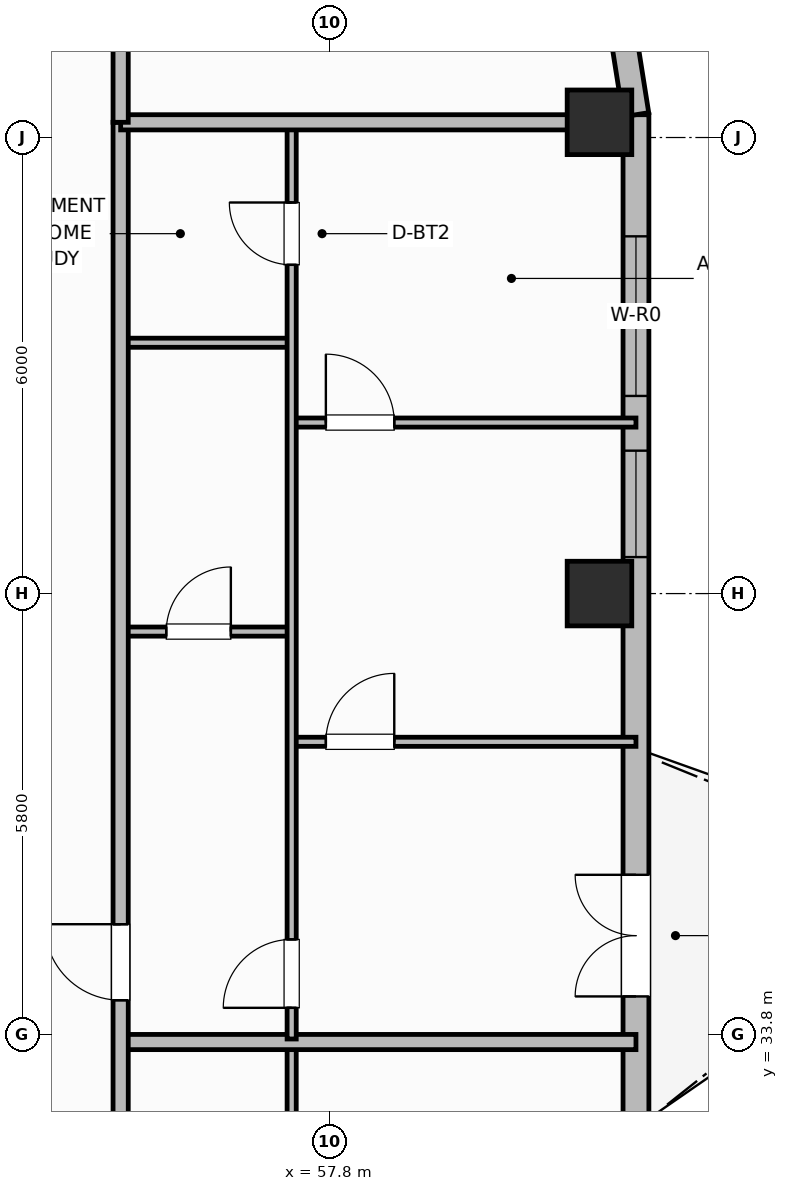
"""IFC4 building model, lengths in metres.
Left out: names, types, materials, properties, quantities, classifications, styles, units other than length and angle.
Written with IfcOpenShell. Run it as: python <this file> out.ifc"""

import sys

from ifc_helpers import new_model, si_unit, direction, frame, frame_2d, origin, origin_2d, place, context, subcontext, project, spatial, rectangle, extrude, element, fill, save


model = new_model("IFC4")
c1 = context("Model", 3, precision=1e-05, world=origin(), true_north=direction((0.0, 1.0)))
c2 = subcontext(c1, "Body", "Model", "MODEL_VIEW")
j1 = project(units=[si_unit("LENGTHUNIT", "METRE"), si_unit("PLANEANGLEUNIT", "RADIAN")], contexts=[c1])
p1 = place(None, origin())
s1 = spatial("IfcSite", under=j1, at=p1, CompositionType="ELEMENT")
p2 = place(p1, origin())
s2 = spatial("IfcBuilding", under=s1, at=p2, CompositionType="ELEMENT")
p3 = place(p2, frame((0.0, 0.0, 211.0)))
s3 = spatial("IfcBuildingStorey", under=s2, at=p3, CompositionType="ELEMENT", Elevation=211.0)
for number, where, z_axis, x_axis in (
    (1, (61.35, 39.6, 0.0), (0.0, 0.0, 1.0), (1.0, 0.0, 0.0)),
    (2, (61.35, 45.8, 0.0), (0.0, 0.0, 1.0), (1.0, 0.0, 0.0)),
):
    element("IfcColumn", number, at=place(p3, frame(where, z_axis=z_axis, x_axis=x_axis)), inside=s3, PredefinedType="COLUMN", context=c2, shape_type="SweptSolid", body=[
        extrude(rectangle(XDim=0.85, YDim=0.85, at=origin_2d()), origin(), (0.0, 0.0, 1.0), 3.7),
    ])
p4 = place(p3, frame((61.83, 32.6, 0.0), z_axis=(0.0, 0.0, 1.0), x_axis=(0.0, 1.0, 0.0)))
e3 = element("IfcWall", 3, at=p4, inside=s3, PredefinedType="SOLIDWALL", context=c2, shape_type="SweptSolid", body=[
    extrude(rectangle(XDim=13.3, YDim=0.34, at=frame_2d((6.65, 0.0))), origin(), (0.0, 0.0, 1.0), 2.72),
])
p5 = place(p4, frame((1.7, 0.0, 0.0)))
e4 = element("IfcOpeningElement", 4, at=p5, cuts=e3, PredefinedType="OPENING", context=c2, shape_type="SweptSolid", body=[
    extrude(rectangle(XDim=1.6, YDim=2.1, at=frame_2d((0.8, 1.05))), frame((0.0, 0.18, 0.0), z_axis=(0.0, -1.0, 0.0), x_axis=(1.0, 0.0, 0.0)), (0.0, 0.0, 1.0), 0.36),
])
p6 = place(p4, frame((7.48, 0.0, 0.71)))
e5 = element("IfcOpeningElement", 5, at=p6, cuts=e3, PredefinedType="OPENING", context=c2, shape_type="SweptSolid", body=[
    extrude(rectangle(XDim=1.4, YDim=1.85, at=frame_2d((0.7, 0.925))), frame((0.0, 0.18, 0.0), z_axis=(0.0, -1.0, 0.0), x_axis=(1.0, 0.0, 0.0)), (0.0, 0.0, 1.0), 0.36),
])
p7 = place(p4, frame((9.6, 0.0, 0.7)))
e6 = element("IfcOpeningElement", 6, at=p7, cuts=e3, PredefinedType="OPENING", context=c2, shape_type="SweptSolid", body=[
    extrude(rectangle(XDim=2.1, YDim=1.9, at=frame_2d((1.05, 0.95))), frame((0.0, 0.18, 0.0), z_axis=(0.0, -1.0, 0.0), x_axis=(1.0, 0.0, 0.0)), (0.0, 0.0, 1.0), 0.36),
])
p8 = place(p3, frame((61.83, 45.9, 0.0), z_axis=(0.0, 0.0, 1.0), x_axis=(-0.156481329164, 0.987680916907, 0.0)))
e7 = element("IfcWall", 7, at=p8, inside=s3, PredefinedType="SOLIDWALL", context=c2, shape_type="SweptSolid", body=[
    extrude(rectangle(XDim=1.136, YDim=0.34, at=frame_2d((0.568, 0.0))), origin(), (0.0, 0.0, 1.0), 2.72),
])
p9 = place(p3, frame((57.3, 22.256, 0.0), z_axis=(0.0, 0.0, 1.0), x_axis=(0.0, 1.0, 0.0)))
e8 = element("IfcWall", 8, at=p9, inside=s3, PredefinedType="PARTITIONING", context=c2, shape_type="SweptSolid", body=[
    extrude(rectangle(XDim=11.404, YDim=0.12, at=frame_2d((5.702, 0.0))), origin(), (0.0, 0.0, 1.0), 2.55),
])
p10 = place(p9, frame((0.41, 0.0, 0.0)))
e9 = element("IfcOpeningElement", 9, at=p10, cuts=e8, PredefinedType="OPENING", context=c2, shape_type="SweptSolid", body=[
    extrude(rectangle(XDim=0.9, YDim=2.1, at=frame_2d((0.45, 1.05))), frame((0.0, 0.07, 0.0), z_axis=(0.0, -1.0, 0.0), x_axis=(1.0, 0.0, 0.0)), (0.0, 0.0, 1.0), 0.14),
])
p11 = place(p3, frame((55.05, 33.7, 0.0), z_axis=(0.0, 0.0, 1.0), x_axis=(1.0, 0.0, 0.0)))
e10 = element("IfcWall", 10, at=p11, inside=s3, PredefinedType="PARTITIONING", context=c2, shape_type="SweptSolid", body=[
    extrude(rectangle(XDim=6.78, YDim=0.2, at=frame_2d((3.39, 0.0))), origin(), (0.0, 0.0, 1.0), 2.55),
])
p12 = place(p3, frame((55.05, 39.1, 0.0), z_axis=(0.0, 0.0, 1.0), x_axis=(1.0, 0.0, 0.0)))
e11 = element("IfcWall", 11, at=p12, inside=s3, PredefinedType="PARTITIONING", context=c2, shape_type="SweptSolid", body=[
    extrude(rectangle(XDim=2.25, YDim=0.12, at=frame_2d((1.125, 0.0))), origin(), (0.0, 0.0, 1.0), 2.55),
])
p13 = place(p12, frame((0.6, 0.0, 0.0)))
e12 = element("IfcOpeningElement", 12, at=p13, cuts=e11, PredefinedType="OPENING", context=c2, shape_type="SweptSolid", body=[
    extrude(rectangle(XDim=0.85, YDim=2.1, at=frame_2d((0.425, 1.05))), frame((0.0, 0.07, 0.0), z_axis=(0.0, -1.0, 0.0), x_axis=(1.0, 0.0, 0.0)), (0.0, 0.0, 1.0), 0.14),
])
p14 = place(p3, frame((55.05, 42.9, 0.0), z_axis=(0.0, 0.0, 1.0), x_axis=(1.0, 0.0, 0.0)))
e13 = element("IfcWall", 13, at=p14, inside=s3, PredefinedType="PARTITIONING", context=c2, shape_type="SweptSolid", body=[
    extrude(rectangle(XDim=2.25, YDim=0.12, at=frame_2d((1.125, 0.0))), origin(), (0.0, 0.0, 1.0), 2.55),
])
p15 = place(p3, frame((57.3, 37.65, 0.0), z_axis=(0.0, 0.0, 1.0), x_axis=(1.0, 0.0, 0.0)))
e14 = element("IfcWall", 14, at=p15, inside=s3, PredefinedType="PARTITIONING", context=c2, shape_type="SweptSolid", body=[
    extrude(rectangle(XDim=4.53, YDim=0.12, at=frame_2d((2.265, 0.0))), origin(), (0.0, 0.0, 1.0), 2.55),
])
p16 = place(p15, frame((0.45, 0.0, 0.0)))
e15 = element("IfcOpeningElement", 15, at=p16, cuts=e14, PredefinedType="OPENING", context=c2, shape_type="SweptSolid", body=[
    extrude(rectangle(XDim=0.9, YDim=2.1, at=frame_2d((0.45, 1.05))), frame((0.0, 0.07, 0.0), z_axis=(0.0, -1.0, 0.0), x_axis=(1.0, 0.0, 0.0)), (0.0, 0.0, 1.0), 0.14),
])
p17 = place(p3, frame((57.3, 41.85, 0.0), z_axis=(0.0, 0.0, 1.0), x_axis=(1.0, 0.0, 0.0)))
e16 = element("IfcWall", 16, at=p17, inside=s3, PredefinedType="PARTITIONING", context=c2, shape_type="SweptSolid", body=[
    extrude(rectangle(XDim=4.53, YDim=0.12, at=frame_2d((2.265, 0.0))), origin(), (0.0, 0.0, 1.0), 2.55),
])
p18 = place(p17, frame((0.45, 0.0, 0.0)))
e17 = element("IfcOpeningElement", 17, at=p18, cuts=e16, PredefinedType="OPENING", context=c2, shape_type="SweptSolid", body=[
    extrude(rectangle(XDim=0.9, YDim=2.1, at=frame_2d((0.45, 1.05))), frame((0.0, 0.07, 0.0), z_axis=(0.0, -1.0, 0.0), x_axis=(1.0, 0.0, 0.0)), (0.0, 0.0, 1.0), 0.14),
])
p19 = place(p3, frame((57.3, 33.74, 0.0), z_axis=(0.0, 0.0, 1.0), x_axis=(0.0, 1.0, 0.0)))
e18 = element("IfcWall", 18, at=p19, inside=s3, PredefinedType="PARTITIONING", context=c2, shape_type="SweptSolid", body=[
    extrude(rectangle(XDim=12.02, YDim=0.12, at=frame_2d((6.01, 0.0))), origin(), (0.0, 0.0, 1.0), 2.55),
])
p20 = place(p19, frame((0.41, 0.0, 0.0)))
e19 = element("IfcOpeningElement", 19, at=p20, cuts=e18, PredefinedType="OPENING", context=c2, shape_type="SweptSolid", body=[
    extrude(rectangle(XDim=0.9, YDim=2.1, at=frame_2d((0.45, 1.05))), frame((0.0, 0.07, 0.0), z_axis=(0.0, -1.0, 0.0), x_axis=(1.0, 0.0, 0.0)), (0.0, 0.0, 1.0), 0.14),
])
p21 = place(p19, frame((10.185, 0.0, 0.0)))
e20 = element("IfcOpeningElement", 20, at=p21, cuts=e18, PredefinedType="OPENING", context=c2, shape_type="SweptSolid", body=[
    extrude(rectangle(XDim=0.82, YDim=2.08, at=frame_2d((0.41, 1.04))), frame((0.0, 0.07, 0.0), z_axis=(0.0, -1.0, 0.0), x_axis=(1.0, 0.0, 0.0)), (0.0, 0.0, 1.0), 0.14),
])
p22 = place(p3, frame((55.05, 10.6, 0.0), z_axis=(0.0, 0.0, 1.0), x_axis=(0.0, 1.0, 0.0)))
e21 = element("IfcWall", 21, at=p22, inside=s3, PredefinedType="PARTITIONING", context=c2, shape_type="SweptSolid", body=[
    extrude(rectangle(XDim=35.2, YDim=0.2, at=frame_2d((17.6, 0.0))), origin(), (0.0, 0.0, 1.0), 2.55),
])
p23 = place(p22, frame((2.65, 0.0, 0.0)))
e22 = element("IfcOpeningElement", 22, at=p23, cuts=e21, PredefinedType="OPENING", context=c2, shape_type="SweptSolid", body=[
    extrude(rectangle(XDim=1.0, YDim=2.15, at=frame_2d((0.5, 1.075))), frame((0.0, 0.11, 0.0), z_axis=(0.0, -1.0, 0.0), x_axis=(1.0, 0.0, 0.0)), (0.0, 0.0, 1.0), 0.22),
])
p24 = place(p22, frame((12.166, 0.0, 0.0)))
e23 = element("IfcOpeningElement", 23, at=p24, cuts=e21, PredefinedType="OPENING", context=c2, shape_type="SweptSolid", body=[
    extrude(rectangle(XDim=1.0, YDim=2.15, at=frame_2d((0.5, 1.075))), frame((0.0, 0.11, 0.0), z_axis=(0.0, -1.0, 0.0), x_axis=(1.0, 0.0, 0.0)), (0.0, 0.0, 1.0), 0.22),
])
p25 = place(p22, frame((23.65, 0.0, 0.0)))
e24 = element("IfcOpeningElement", 24, at=p25, cuts=e21, PredefinedType="OPENING", context=c2, shape_type="SweptSolid", body=[
    extrude(rectangle(XDim=1.0, YDim=2.15, at=frame_2d((0.5, 1.075))), frame((0.0, 0.11, 0.0), z_axis=(0.0, -1.0, 0.0), x_axis=(1.0, 0.0, 0.0)), (0.0, 0.0, 1.0), 0.22),
])
p26 = place(p3, frame((55.05, 45.8, 0.0), z_axis=(0.0, 0.0, 1.0), x_axis=(1.0, 0.0, 0.0)))
e25 = element("IfcWall", 25, at=p26, inside=s3, PredefinedType="PARTITIONING", context=c2, shape_type="SweptSolid", body=[
    extrude(rectangle(XDim=6.36, YDim=0.2, at=frame_2d((3.18, 0.0))), origin(), (0.0, 0.0, 1.0), 2.55),
])
p27 = place(p3, frame((55.05, 45.8, 0.0), z_axis=(0.0, 0.0, 1.0), x_axis=(0.0, 1.0, 0.0)))
e26 = element("IfcWall", 26, at=p27, inside=s3, PredefinedType="PARTITIONING", context=c2, shape_type="SweptSolid", body=[
    extrude(rectangle(XDim=3.73, YDim=0.2, at=frame_2d((1.865, 0.0))), origin(), (0.0, 0.0, 1.0), 2.55),
])
p28 = place(p5, origin())
e27 = element("IfcDoor", 27, at=p28, inside=s3, OperationType="DOUBLE_DOOR_SINGLE_SWING", PredefinedType="DOOR", context=c2, shape_type="SweptSolid", body=[
    extrude(rectangle(XDim=1.6, YDim=2.1, at=frame_2d((0.8, 1.05))), frame((0.0, 0.025, 0.0), z_axis=(0.0, -1.0, 0.0), x_axis=(1.0, 0.0, 0.0)), (0.0, 0.0, 1.0), 0.05),
])
fill(e4, e27)
p29 = place(p6, origin())
e28 = element("IfcWindow", 28, at=p29, inside=s3, PartitioningType="SINGLE_PANEL", PredefinedType="WINDOW", context=c2, shape_type="SweptSolid", body=[
    extrude(rectangle(XDim=1.4, YDim=1.85, at=frame_2d((0.7, 0.925))), frame((0.0, 0.03, 0.0), z_axis=(0.0, -1.0, 0.0), x_axis=(1.0, 0.0, 0.0)), (0.0, 0.0, 1.0), 0.06),
])
fill(e5, e28)
p30 = place(p7, origin())
e29 = element("IfcWindow", 29, at=p30, inside=s3, PartitioningType="SINGLE_PANEL", PredefinedType="WINDOW", context=c2, shape_type="SweptSolid", body=[
    extrude(rectangle(XDim=2.1, YDim=1.9, at=frame_2d((1.05, 0.95))), frame((0.0, 0.03, 0.0), z_axis=(0.0, -1.0, 0.0), x_axis=(1.0, 0.0, 0.0)), (0.0, 0.0, 1.0), 0.06),
])
fill(e6, e29)
p31 = place(p13, origin())
e30 = element("IfcDoor", 30, at=p31, inside=s3, OperationType="SINGLE_SWING_RIGHT", PredefinedType="DOOR", context=c2, shape_type="SweptSolid", body=[
    extrude(rectangle(XDim=0.85, YDim=2.1, at=frame_2d((0.425, 1.05))), frame((0.0, 0.025, 0.0), z_axis=(0.0, -1.0, 0.0), x_axis=(1.0, 0.0, 0.0)), (0.0, 0.0, 1.0), 0.05),
])
fill(e12, e30)
p32 = place(p16, origin())
e31 = element("IfcDoor", 31, at=p32, inside=s3, OperationType="SINGLE_SWING_RIGHT", PredefinedType="DOOR", context=c2, shape_type="SweptSolid", body=[
    extrude(rectangle(XDim=0.9, YDim=2.1, at=frame_2d((0.45, 1.05))), frame((0.0, 0.025, 0.0), z_axis=(0.0, -1.0, 0.0), x_axis=(1.0, 0.0, 0.0)), (0.0, 0.0, 1.0), 0.05),
])
fill(e15, e31)
p33 = place(p18, origin())
e32 = element("IfcDoor", 32, at=p33, inside=s3, OperationType="SINGLE_SWING_LEFT", PredefinedType="DOOR", context=c2, shape_type="SweptSolid", body=[
    extrude(rectangle(XDim=0.9, YDim=2.1, at=frame_2d((0.45, 1.05))), frame((0.0, 0.025, 0.0), z_axis=(0.0, -1.0, 0.0), x_axis=(1.0, 0.0, 0.0)), (0.0, 0.0, 1.0), 0.05),
])
fill(e17, e32)
p34 = place(p20, origin())
e33 = element("IfcDoor", 33, at=p34, inside=s3, OperationType="SINGLE_SWING_LEFT", PredefinedType="DOOR", context=c2, shape_type="SweptSolid", body=[
    extrude(rectangle(XDim=0.9, YDim=2.1, at=frame_2d((0.45, 1.05))), frame((0.0, 0.025, 0.0), z_axis=(0.0, -1.0, 0.0), x_axis=(1.0, 0.0, 0.0)), (0.0, 0.0, 1.0), 0.05),
])
fill(e19, e33)
p35 = place(p21, origin())
e34 = element("IfcDoor", 34, at=p35, inside=s3, OperationType="SINGLE_SWING_RIGHT", PredefinedType="DOOR", context=c2, shape_type="SweptSolid", body=[
    extrude(rectangle(XDim=0.82, YDim=2.08, at=frame_2d((0.41, 1.04))), frame((0.0, 0.025, 0.0), z_axis=(0.0, -1.0, 0.0), x_axis=(1.0, 0.0, 0.0)), (0.0, 0.0, 1.0), 0.05),
])
fill(e20, e34)
p36 = place(p25, origin())
e35 = element("IfcDoor", 35, at=p36, inside=s3, OperationType="SINGLE_SWING_RIGHT", PredefinedType="DOOR", context=c2, shape_type="SweptSolid", body=[
    extrude(rectangle(XDim=1.0, YDim=2.15, at=frame_2d((0.5, 1.075))), frame((0.0, 0.025, 0.0), z_axis=(0.0, -1.0, 0.0), x_axis=(1.0, 0.0, 0.0)), (0.0, 0.0, 1.0), 0.05),
])
fill(e24, e35)
save(model, sys.argv[1])
